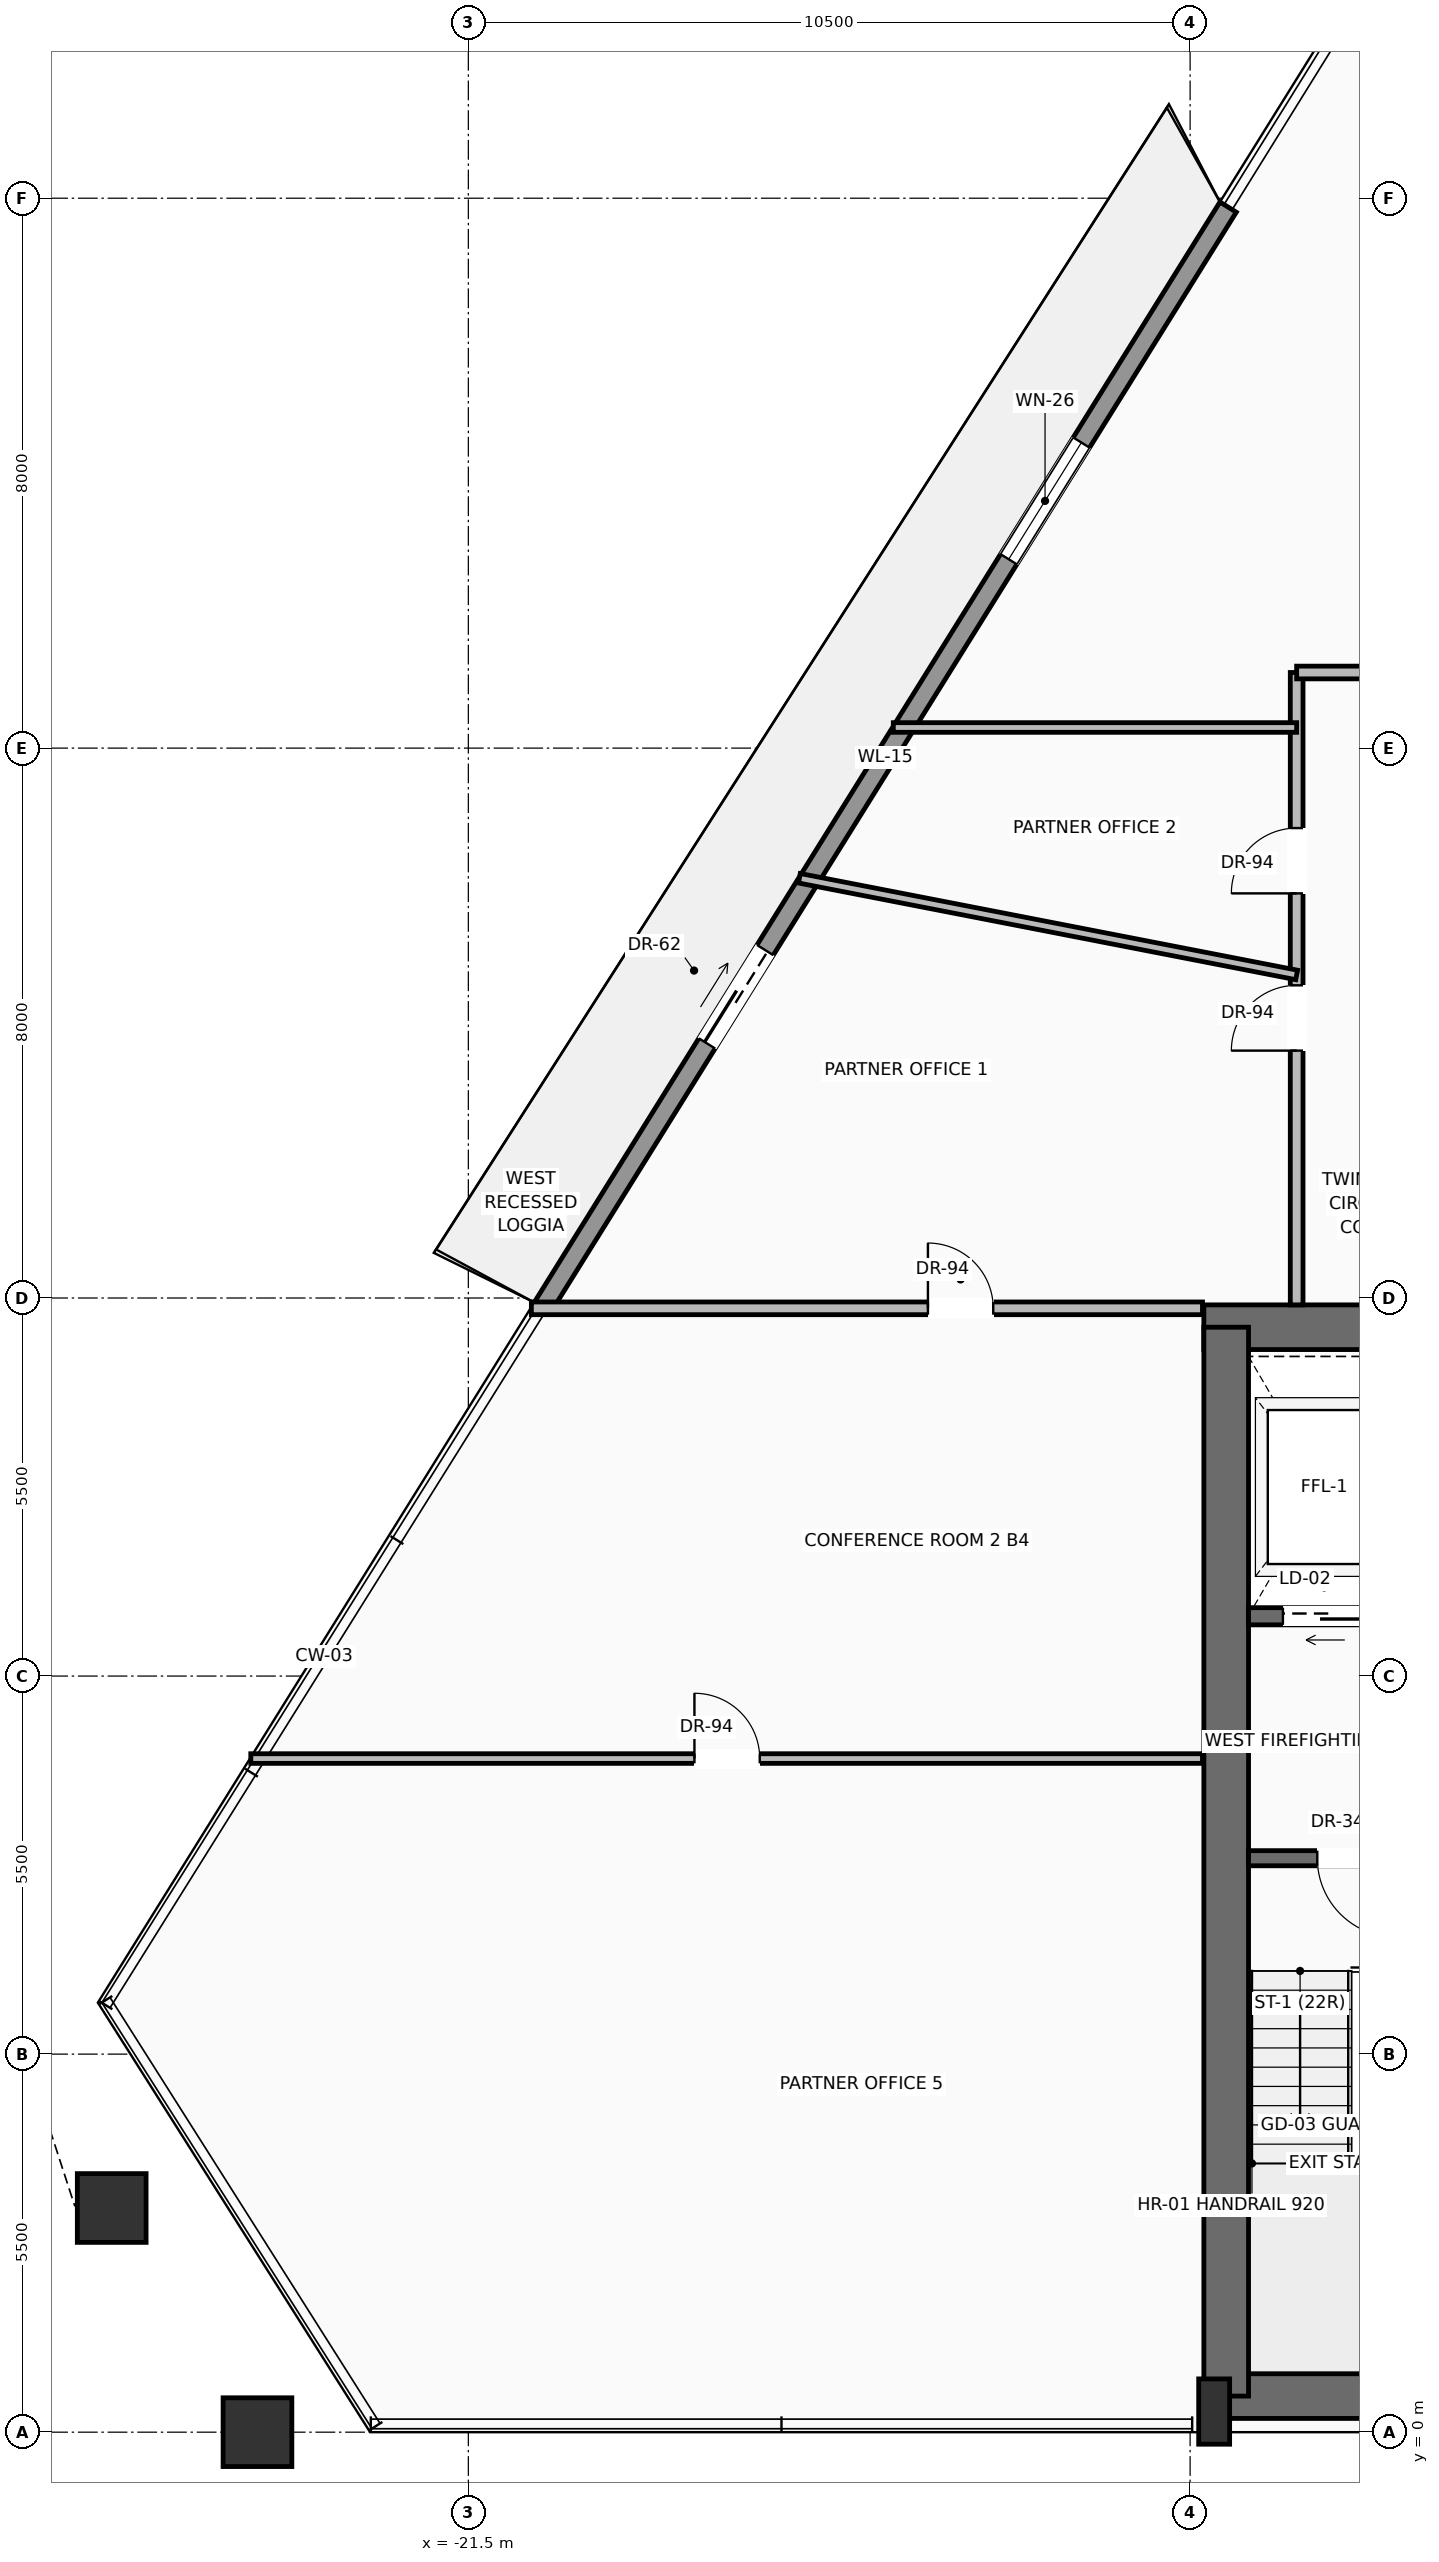
"""IFC4 building model, lengths in metres.
Left out: names, types, materials, properties, quantities, classifications, styles, units other than length and angle.
Written with IfcOpenShell. Run it as: python <this file> out.ifc"""

import sys

from ifc_helpers import new_model, si_unit, direction, frame, frame_2d, origin, origin_2d, place, context, subcontext, project, spatial, rectangle, hollow_rectangle, extrude, source, transform, mapped, element, fill, save


model = new_model("IFC4")
c1 = context("Model", 3, precision=1e-05, world=origin(), true_north=direction((0.0, 1.0)))
c2 = subcontext(c1, "Body", "Model", "MODEL_VIEW")
j1 = project(units=[si_unit("LENGTHUNIT", "METRE"), si_unit("PLANEANGLEUNIT", "RADIAN")], contexts=[c1])
p1 = place(None, origin())
s1 = spatial("IfcSite", under=j1, at=p1, CompositionType="ELEMENT")
p2 = place(p1, origin())
s2 = spatial("IfcBuilding", under=s1, at=p2, CompositionType="ELEMENT")
p3 = place(p2, frame((0.0, 0.0, 182.1)))
s3 = spatial("IfcBuildingStorey", under=s2, at=p3, CompositionType="ELEMENT", Elevation=182.1)
p4 = place(p3, frame((-10.65, 0.525, 0.0), z_axis=(0.0, 0.0, 1.0), x_axis=(1.0, 0.0, 0.0)))
e1 = element("IfcWall", 1, at=p4, inside=s3, PredefinedType="SHEAR", context=c2, shape_type="SweptSolid", body=[
    extrude(rectangle(XDim=21.3, YDim=0.65, at=frame_2d((10.65, 0.0))), origin(), (0.0, 0.0, 1.0), 3.47),
])
p5 = place(p3, frame((-10.8, 16.075, 0.0), z_axis=(0.0, 0.0, 1.0), x_axis=(1.0, 0.0, 0.0)))
e2 = element("IfcWall", 2, at=p5, inside=s3, PredefinedType="SHEAR", context=c2, shape_type="SweptSolid", body=[
    extrude(rectangle(XDim=21.6, YDim=0.65, at=frame_2d((10.8, 0.0))), origin(), (0.0, 0.0, 1.0), 3.47),
])
p6 = place(p5, frame((3.37, 0.0, 0.0)))
e3 = element("IfcOpeningElement", 3, at=p6, cuts=e2, PredefinedType="OPENING", context=c2, shape_type="SweptSolid", body=[
    extrude(rectangle(XDim=1.3, YDim=2.3, at=frame_2d((0.65, 1.15))), frame((0.0, 0.335, 0.0), z_axis=(0.0, -1.0, 0.0), x_axis=(1.0, 0.0, 0.0)), (0.0, 0.0, 1.0), 0.67),
])
p7 = place(p5, frame((9.8, 0.0, 0.0)))
e4 = element("IfcOpeningElement", 4, at=p7, cuts=e2, PredefinedType="OPENING", context=c2, shape_type="SweptSolid", body=[
    extrude(rectangle(XDim=2.0, YDim=2.4, at=frame_2d((1.0, 1.2))), frame((0.0, 0.335, 0.0), z_axis=(0.0, -1.0, 0.0), x_axis=(1.0, 0.0, 0.0)), (0.0, 0.0, 1.0), 0.67),
])
p8 = place(p3, frame((-10.475, 0.525, 0.0), z_axis=(0.0, 0.0, 1.0), x_axis=(0.0, 1.0, 0.0)))
e5 = element("IfcWall", 5, at=p8, inside=s3, PredefinedType="SHEAR", context=c2, shape_type="SweptSolid", body=[
    extrude(rectangle(XDim=15.55, YDim=0.65, at=frame_2d((7.775, 0.0))), origin(), (0.0, 0.0, 1.0), 3.47),
])
m1 = source(origin(), c2, "Body", "SweptSolid", [
    extrude(rectangle(XDim=0.45, YDim=0.95, at=origin_2d()), origin(), (0.0, 0.0, 1.0), 3.7),
])
p9 = place(p3, frame((-10.65, 0.3, 0.0), z_axis=(0.0, 0.0, 1.0), x_axis=(1.0, 0.0, 0.0)))
e6 = element("IfcColumn", 6, at=p9, inside=s3, PredefinedType="PILASTER", context=c2, shape_type="MappedRepresentation", body=[
    mapped(m1, transform((0.0, 0.0, 0.0), scale=1.0)),
])
m2 = source(origin(), c2, "Body", "SweptSolid", [
    extrude(hollow_rectangle(XDim=1.0, YDim=1.0, WallThickness=0.05, at=origin_2d()), origin(), (0.0, 0.0, 1.0), 3.691),
])
p10 = place(p3, frame((-24.568, 0.0, 0.004), z_axis=(-0.007539966892, 0.0, 0.999971574046), x_axis=(0.0, -1.0, 0.0)))
e7 = element("IfcColumn", 7, at=p10, inside=s3, PredefinedType="COLUMN", context=c2, shape_type="MappedRepresentation", body=[
    mapped(m2, transform((0.0, 0.0, 0.0), scale=1.0)),
])
m3 = source(origin(), c2, "Body", "SweptSolid", [
    extrude(hollow_rectangle(XDim=1.0, YDim=1.0, WallThickness=0.05, at=origin_2d()), origin(), (0.0, 0.0, 1.0), 3.692),
])
p11 = place(p3, frame((-26.688, 3.261, 0.004), z_axis=(0.002843748448, -0.015541415935, 0.999875180953), x_axis=(0.983668370017, 0.179990382599, 0.0)))
e8 = element("IfcColumn", 8, at=p11, inside=s3, PredefinedType="COLUMN", context=c2, shape_type="MappedRepresentation", body=[
    mapped(m3, transform((0.0, 0.0, 0.0), scale=1.0)),
])
p12 = place(p3, frame((-20.423, 16.362, 0.0), z_axis=(0.0, 0.0, 1.0), x_axis=(0.528858297752, 0.848710139505, 0.0)))
e9 = element("IfcWall", 9, at=p12, inside=s3, PredefinedType="SOLIDWALL", context=c2, shape_type="SweptSolid", body=[
    extrude(rectangle(XDim=18.863, YDim=0.28, at=frame_2d((9.431, 0.0))), origin(), (0.0, 0.0, 1.0), 3.05),
])
p13 = place(p12, frame((4.527, 0.0, 0.0)))
e10 = element("IfcOpeningElement", 10, at=p13, cuts=e9, PredefinedType="OPENING", context=c2, shape_type="SweptSolid", body=[
    extrude(rectangle(XDim=1.6, YDim=2.35, at=frame_2d((0.8, 1.175))), frame((0.0, 0.15, 0.0), z_axis=(0.0, -1.0, 0.0), x_axis=(1.0, 0.0, 0.0)), (0.0, 0.0, 1.0), 0.3),
])
p14 = place(p12, frame((12.826, 0.0, 0.9)))
e11 = element("IfcOpeningElement", 11, at=p14, cuts=e9, PredefinedType="OPENING", context=c2, shape_type="SweptSolid", body=[
    extrude(rectangle(XDim=2.0, YDim=1.85, at=frame_2d((1.0, 0.925))), frame((0.0, 0.15, 0.0), z_axis=(0.0, -1.0, 0.0), x_axis=(1.0, 0.0, 0.0)), (0.0, 0.0, 1.0), 0.3),
])
p15 = place(p3, frame((-5.5, 8.35, 0.0), z_axis=(0.0, 0.0, 1.0), x_axis=(-1.0, 0.0, 0.0)))
e12 = element("IfcWall", 12, at=p15, inside=s3, PredefinedType="SOLIDWALL", context=c2, shape_type="SweptSolid", body=[
    extrude(rectangle(XDim=4.65, YDim=0.22, at=frame_2d((2.325, 0.0))), origin(), (0.0, 0.0, 1.0), 3.47),
])
p16 = place(p15, frame((2.5, 0.0, 0.0)))
e13 = element("IfcOpeningElement", 13, at=p16, cuts=e12, PredefinedType="OPENING", context=c2, shape_type="SweptSolid", body=[
    extrude(rectangle(XDim=1.15, YDim=2.2, at=frame_2d((0.575, 1.1))), frame((0.0, 0.12, 0.0), z_axis=(0.0, -1.0, 0.0), x_axis=(1.0, 0.0, 0.0)), (0.0, 0.0, 1.0), 0.24),
])
p17 = place(p3, frame((-5.5, 11.87, 0.0), z_axis=(0.0, 0.0, 1.0), x_axis=(-1.0, 0.0, 0.0)))
e14 = element("IfcWall", 14, at=p17, inside=s3, PredefinedType="SOLIDWALL", context=c2, shape_type="SweptSolid", body=[
    extrude(rectangle(XDim=4.65, YDim=0.25, at=frame_2d((2.325, 0.0))), origin(), (0.0, 0.0, 1.0), 3.47),
])
p18 = place(p17, frame((2.95, 0.0, 0.0)))
e15 = element("IfcOpeningElement", 15, at=p18, cuts=e14, PredefinedType="OPENING", context=c2, shape_type="SweptSolid", body=[
    extrude(rectangle(XDim=1.2, YDim=2.25, at=frame_2d((0.6, 1.125))), frame((0.0, 0.135, 0.0), z_axis=(0.0, -1.0, 0.0), x_axis=(1.0, 0.0, 0.0)), (0.0, 0.0, 1.0), 0.27),
])
p19 = place(p3, frame((-9.45, 16.4, 0.0), z_axis=(0.0, 0.0, 1.0), x_axis=(0.0, 1.0, 0.0)))
e16 = element("IfcWall", 16, at=p19, inside=s3, PredefinedType="PARTITIONING", context=c2, shape_type="SweptSolid", body=[
    extrude(rectangle(XDim=9.2, YDim=0.185, at=frame_2d((4.6, 0.0))), origin(), (0.0, 0.0, 1.0), 2.846),
])
p20 = place(p19, frame((3.699, 0.0, 0.0)))
e17 = element("IfcOpeningElement", 17, at=p20, cuts=e16, PredefinedType="OPENING", context=c2, shape_type="SweptSolid", body=[
    extrude(rectangle(XDim=0.95, YDim=2.2, at=frame_2d((0.475, 1.1))), frame((0.0, 0.103, 0.0), z_axis=(0.0, -1.0, 0.0), x_axis=(1.0, 0.0, 0.0)), (0.0, 0.0, 1.0), 0.205),
])
p21 = place(p19, frame((5.987, 0.0, 0.0)))
e18 = element("IfcOpeningElement", 18, at=p21, cuts=e16, PredefinedType="OPENING", context=c2, shape_type="SweptSolid", body=[
    extrude(rectangle(XDim=0.95, YDim=2.2, at=frame_2d((0.475, 1.1))), frame((0.0, 0.103, 0.0), z_axis=(0.0, -1.0, 0.0), x_axis=(1.0, 0.0, 0.0)), (0.0, 0.0, 1.0), 0.205),
])
p22 = place(p3, frame((-9.45, 25.6, 0.0), z_axis=(0.0, 0.0, 1.0), x_axis=(1.0, 0.0, 0.0)))
e19 = element("IfcWall", 19, at=p22, inside=s3, PredefinedType="PARTITIONING", context=c2, shape_type="SweptSolid", body=[
    extrude(rectangle(XDim=2.2, YDim=0.185, at=frame_2d((1.1, 0.0))), origin(), (0.0, 0.0, 1.0), 3.462),
])
p23 = place(p3, frame((-20.583, 16.35, 0.0), z_axis=(0.0, 0.0, 1.0), x_axis=(1.0, 0.0, 0.0)))
e20 = element("IfcWall", 20, at=p23, inside=s3, PredefinedType="PARTITIONING", context=c2, shape_type="SweptSolid", body=[
    extrude(rectangle(XDim=9.763, YDim=0.185, at=frame_2d((4.882, 0.0))), origin(), (0.0, 0.0, 1.0), 3.462),
])
p24 = place(p23, frame((5.769, 0.0, 0.0)))
e21 = element("IfcOpeningElement", 21, at=p24, cuts=e20, PredefinedType="OPENING", context=c2, shape_type="SweptSolid", body=[
    extrude(rectangle(XDim=0.95, YDim=2.2, at=frame_2d((0.475, 1.1))), frame((0.0, 0.103, 0.0), z_axis=(0.0, -1.0, 0.0), x_axis=(1.0, 0.0, 0.0)), (0.0, 0.0, 1.0), 0.205),
])
p25 = place(p3, frame((-24.665, 9.8, 0.0), z_axis=(0.0, 0.0, 1.0), x_axis=(1.0, 0.0, 0.0)))
e22 = element("IfcWall", 22, at=p25, inside=s3, PredefinedType="PARTITIONING", context=c2, shape_type="SweptSolid", body=[
    extrude(rectangle(XDim=13.845, YDim=0.14, at=frame_2d((6.922, 0.0))), origin(), (0.0, 0.0, 1.0), 3.049),
])
p26 = place(p25, frame((6.454, 0.0, 0.0)))
e23 = element("IfcOpeningElement", 23, at=p26, cuts=e22, PredefinedType="OPENING", context=c2, shape_type="SweptSolid", body=[
    extrude(rectangle(XDim=0.95, YDim=2.2, at=frame_2d((0.475, 1.1))), frame((0.0, 0.08, 0.0), z_axis=(0.0, -1.0, 0.0), x_axis=(1.0, 0.0, 0.0)), (0.0, 0.0, 1.0), 0.16),
])
p27 = place(p3, frame((-16.685, 22.607, 0.0), z_axis=(0.0, 0.0, 1.0), x_axis=(0.981615217267, -0.190870545739, 0.0)))
e24 = element("IfcWall", 24, at=p27, inside=s3, PredefinedType="PARTITIONING", context=c2, shape_type="SweptSolid", body=[
    extrude(rectangle(XDim=7.37, YDim=0.14, at=frame_2d((3.685, 0.0))), origin(), (0.0, 0.0, 1.0), 3.049),
])
p28 = place(p3, frame((-15.318, 24.8, 0.0), z_axis=(0.0, 0.0, 1.0), x_axis=(1.0, 0.0, 0.0)))
e25 = element("IfcWall", 25, at=p28, inside=s3, PredefinedType="PARTITIONING", context=c2, shape_type="SweptSolid", body=[
    extrude(rectangle(XDim=5.868, YDim=0.14, at=frame_2d((2.934, 0.0))), origin(), (0.0, 0.0, 1.0), 3.462),
])
m4 = source(origin(), c2, "Body", "SweptSolid", [
    extrude(rectangle(XDim=1.6, YDim=2.35, at=frame_2d((0.8, 1.175))), frame((0.0, 0.025, 0.0), z_axis=(0.0, -1.0, 0.0), x_axis=(1.0, 0.0, 0.0)), (0.0, 0.0, 1.0), 0.05),
])
p29 = place(p13, origin())
e26 = element("IfcDoor", 26, at=p29, inside=s3, OperationType="SLIDING_TO_LEFT", PredefinedType="DOOR", context=c2, shape_type="MappedRepresentation", body=[
    mapped(m4, transform((0.0, 0.0, 0.0), scale=1.0)),
])
fill(e10, e26)
m5 = source(origin(), c2, "Body", "SweptSolid", [
    extrude(rectangle(XDim=2.0, YDim=1.85, at=frame_2d((1.0, 0.925))), frame((0.0, 0.03, 0.0), z_axis=(0.0, -1.0, 0.0), x_axis=(1.0, 0.0, 0.0)), (0.0, 0.0, 1.0), 0.06),
])
p30 = place(p14, origin())
e27 = element("IfcWindow", 27, at=p30, inside=s3, PartitioningType="SINGLE_PANEL", PredefinedType="WINDOW", context=c2, shape_type="MappedRepresentation", body=[
    mapped(m5, transform((0.0, 0.0, 0.0), scale=1.0)),
])
fill(e11, e27)
m6 = source(origin(), c2, "Body", "SweptSolid", [
    extrude(rectangle(XDim=1.15, YDim=2.2, at=frame_2d((0.575, 1.1))), frame((0.0, 0.025, 0.0), z_axis=(0.0, -1.0, 0.0), x_axis=(1.0, 0.0, 0.0)), (0.0, 0.0, 1.0), 0.05),
])
p31 = place(p16, origin())
e28 = element("IfcDoor", 28, at=p31, inside=s3, OperationType="SINGLE_SWING_LEFT", PredefinedType="DOOR", context=c2, shape_type="MappedRepresentation", body=[
    mapped(m6, transform((0.0, 0.0, 0.0), scale=1.0)),
])
fill(e13, e28)
m7 = source(origin(), c2, "Body", "SweptSolid", [
    extrude(rectangle(XDim=1.2, YDim=2.25, at=frame_2d((0.6, 1.125))), frame((0.0, 0.025, 0.0), z_axis=(0.0, -1.0, 0.0), x_axis=(1.0, 0.0, 0.0)), (0.0, 0.0, 1.0), 0.05),
])
p32 = place(p18, origin())
e29 = element("IfcDoor", 29, at=p32, inside=s3, OperationType="SLIDING_TO_LEFT", PredefinedType="DOOR", context=c2, shape_type="MappedRepresentation", body=[
    mapped(m7, transform((0.0, 0.0, 0.0), scale=1.0)),
])
fill(e15, e29)
m8 = source(origin(), c2, "Body", "SweptSolid", [
    extrude(rectangle(XDim=0.95, YDim=2.2, at=frame_2d((0.475, 1.1))), frame((0.0, 0.025, 0.0), z_axis=(0.0, -1.0, 0.0), x_axis=(1.0, 0.0, 0.0)), (0.0, 0.0, 1.0), 0.05),
])
p33 = place(p20, origin())
e30 = element("IfcDoor", 30, at=p33, inside=s3, OperationType="SINGLE_SWING_LEFT", PredefinedType="DOOR", context=c2, shape_type="MappedRepresentation", body=[
    mapped(m8, transform((0.0, 0.0, 0.0), scale=1.0)),
])
fill(e17, e30)
p34 = place(p24, origin())
e31 = element("IfcDoor", 31, at=p34, inside=s3, OperationType="SINGLE_SWING_LEFT", PredefinedType="DOOR", context=c2, shape_type="MappedRepresentation", body=[
    mapped(m8, transform((0.0, 0.0, 0.0), scale=1.0)),
])
fill(e21, e31)
p35 = place(p26, origin())
e32 = element("IfcDoor", 32, at=p35, inside=s3, OperationType="SINGLE_SWING_LEFT", PredefinedType="DOOR", context=c2, shape_type="MappedRepresentation", body=[
    mapped(m8, transform((0.0, 0.0, 0.0), scale=1.0)),
])
fill(e23, e32)
p36 = place(p21, origin())
e33 = element("IfcDoor", 33, at=p36, inside=s3, OperationType="SINGLE_SWING_LEFT", PredefinedType="DOOR", context=c2, shape_type="MappedRepresentation", body=[
    mapped(m8, transform((0.0, 0.0, 0.0), scale=1.0)),
])
fill(e18, e33)
save(model, sys.argv[1])
